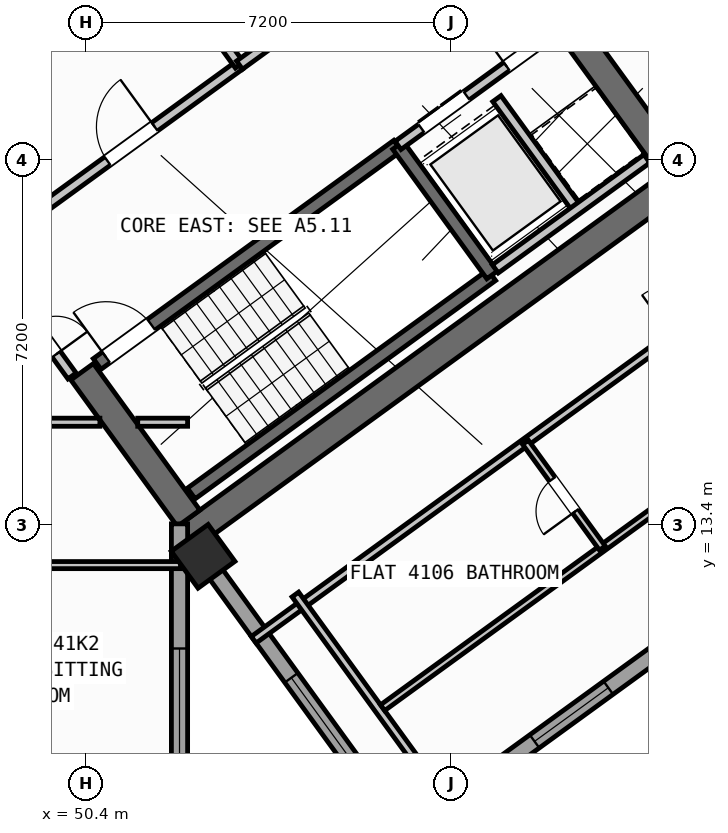
"""IFC4 building model, lengths in metres.
Left out: names, types, materials, properties, quantities, classifications, styles, units other than length and angle.
Written with IfcOpenShell. Run it as: python <this file> out.ifc"""

import sys

from ifc_helpers import new_model, si_unit, direction, frame, frame_2d, origin, origin_2d, place, context, subcontext, project, spatial, rectangle, hollow_rectangle, extrude, source, transform, mapped, element, fill, save


model = new_model("IFC4")
c1 = context("Model", 3, precision=1e-05, world=origin(), true_north=direction((0.0, 1.0)))
c2 = subcontext(c1, "Body", "Model", "MODEL_VIEW")
j1 = project(units=[si_unit("LENGTHUNIT", "METRE"), si_unit("PLANEANGLEUNIT", "RADIAN")], contexts=[c1])
p1 = place(None, origin())
s1 = spatial("IfcSite", under=j1, at=p1, CompositionType="ELEMENT")
p2 = place(p1, origin())
s2 = spatial("IfcBuilding", under=s1, at=p2, CompositionType="ELEMENT")
p3 = place(p2, frame((0.0, 0.0, 162.3)))
s3 = spatial("IfcBuildingStorey", under=s2, at=p3, CompositionType="ELEMENT", Elevation=162.3)
p4 = place(p3, frame((52.359, 13.14, 0.0), z_axis=(0.0, 0.0, 1.0), x_axis=(0.809014896919, 0.587788139183, 0.0)))
e1 = element("IfcWall", 1, at=p4, inside=s3, PredefinedType="SHEAR", context=c2, shape_type="SweptSolid", body=[
    extrude(rectangle(XDim=12.34, YDim=0.55, at=frame_2d((6.17, 0.0))), origin(), (0.0, 0.0, 1.0), 3.35),
])
for number, where, z_axis, x_axis in (
    (2, (52.42, 13.524, 0.0), (0.0, 0.0, 1.0), (-0.588, 0.809, 0.0)),
    (3, (61.958, 20.454, 0.0), (0.0, 0.0, 1.0), (-0.588, 0.809, 0.0)),
):
    element("IfcWall", number, at=place(p3, frame(where, z_axis=z_axis, x_axis=x_axis)), inside=s3, PredefinedType="SHEAR", context=c2, shape_type="SweptSolid", body=[
        extrude(rectangle(XDim=3.575, YDim=0.55, at=frame_2d((1.788, 0.0))), origin(), (0.0, 0.0, 1.0), 3.35),
    ])
m1 = source(origin(), c2, "Body", "SweptSolid", [
    extrude(hollow_rectangle(XDim=0.9, YDim=0.9, WallThickness=0.036, at=origin_2d()), origin(), (0.0, 0.0, 1.0), 3.6),
])
p5 = place(p3, frame((52.705, 12.773, 0.0), z_axis=(0.0, 0.0, 1.0), x_axis=(0.809016994375, 0.587785252292, 0.0)))
e4 = element("IfcColumn", 4, at=p5, inside=s3, PredefinedType="COLUMN", context=c2, shape_type="MappedRepresentation", body=[
    mapped(m1, transform((0.0, 0.0, 0.0), scale=1.0)),
])
p6 = place(p3, frame((58.455, 35.484, 0.0), z_axis=(0.0, 0.0, 1.0), x_axis=(0.587783625747, -0.809018176127, 0.0)))
e5 = element("IfcWall", 5, at=p6, inside=s3, PredefinedType="STANDARD", context=c2, shape_type="SweptSolid", body=[
    extrude(rectangle(XDim=21.587, YDim=0.32, at=frame_2d((10.794, 0.0))), origin(), (0.0, 0.0, 1.0), 2.775),
])
p7 = place(p6, frame((1.475, 0.0, 0.8)))
e6 = element("IfcOpeningElement", 6, at=p7, cuts=e5, PredefinedType="OPENING", context=c2, shape_type="SweptSolid", body=[
    extrude(rectangle(XDim=2.1, YDim=1.55, at=frame_2d((1.05, 0.775))), frame((0.0, 0.17, 0.0), z_axis=(0.0, -1.0, 0.0), x_axis=(1.0, 0.0, 0.0)), (0.0, 0.0, 1.0), 0.34),
])
p8 = place(p6, frame((5.13, 0.0, 0.85)))
e7 = element("IfcOpeningElement", 7, at=p8, cuts=e5, PredefinedType="OPENING", context=c2, shape_type="SweptSolid", body=[
    extrude(rectangle(XDim=1.5, YDim=1.5, at=frame_2d((0.75, 0.75))), frame((0.0, 0.17, 0.0), z_axis=(0.0, -1.0, 0.0), x_axis=(1.0, 0.0, 0.0)), (0.0, 0.0, 1.0), 0.34),
])
p9 = place(p6, frame((8.929, 0.0, 0.85)))
e8 = element("IfcOpeningElement", 8, at=p9, cuts=e5, PredefinedType="OPENING", context=c2, shape_type="SweptSolid", body=[
    extrude(rectangle(XDim=1.5, YDim=1.5, at=frame_2d((0.75, 0.75))), frame((0.0, 0.17, 0.0), z_axis=(0.0, -1.0, 0.0), x_axis=(1.0, 0.0, 0.0)), (0.0, 0.0, 1.0), 0.34),
])
p10 = place(p6, frame((17.581, 0.0, 0.95)))
e9 = element("IfcOpeningElement", 9, at=p10, cuts=e5, PredefinedType="OPENING", context=c2, shape_type="SweptSolid", body=[
    extrude(rectangle(XDim=1.2, YDim=1.4, at=frame_2d((0.6, 0.7))), frame((0.0, 0.17, 0.0), z_axis=(0.0, -1.0, 0.0), x_axis=(1.0, 0.0, 0.0)), (0.0, 0.0, 1.0), 0.34),
])
p11 = place(p3, frame((71.098, 17.731, 0.0), z_axis=(0.0, 0.0, 1.0), x_axis=(-0.809021120468, -0.587779573171, 0.0)))
e10 = element("IfcWall", 10, at=p11, inside=s3, PredefinedType="STANDARD", context=c2, shape_type="SweptSolid", body=[
    extrude(rectangle(XDim=17.588, YDim=0.32, at=frame_2d((8.794, 0.0))), origin(), (0.0, 0.0, 1.0), 3.35),
])
p12 = place(p11, frame((1.624, 0.0, 0.0)))
e11 = element("IfcOpeningElement", 11, at=p12, cuts=e10, PredefinedType="OPENING", context=c2, shape_type="SweptSolid", body=[
    extrude(rectangle(XDim=1.05, YDim=2.15, at=frame_2d((0.525, 1.075))), frame((0.0, 0.17, 0.0), z_axis=(0.0, -1.0, 0.0), x_axis=(1.0, 0.0, 0.0)), (0.0, 0.0, 1.0), 0.34),
])
p13 = place(p11, frame((4.104, 0.0, 1.0)))
e12 = element("IfcOpeningElement", 12, at=p13, cuts=e10, PredefinedType="OPENING", context=c2, shape_type="SweptSolid", body=[
    extrude(rectangle(XDim=0.9, YDim=1.25, at=frame_2d((0.45, 0.625))), frame((0.0, 0.17, 0.0), z_axis=(0.0, -1.0, 0.0), x_axis=(1.0, 0.0, 0.0)), (0.0, 0.0, 1.0), 0.34),
])
p14 = place(p11, frame((7.879, 0.0, 0.85)))
e13 = element("IfcOpeningElement", 13, at=p14, cuts=e10, PredefinedType="OPENING", context=c2, shape_type="SweptSolid", body=[
    extrude(rectangle(XDim=1.8, YDim=1.5, at=frame_2d((0.9, 0.75))), frame((0.0, 0.17, 0.0), z_axis=(0.0, -1.0, 0.0), x_axis=(1.0, 0.0, 0.0)), (0.0, 0.0, 1.0), 0.34),
])
p15 = place(p11, frame((12.849, 0.0, 0.85)))
e14 = element("IfcOpeningElement", 14, at=p15, cuts=e10, PredefinedType="OPENING", context=c2, shape_type="SweptSolid", body=[
    extrude(rectangle(XDim=1.8, YDim=1.5, at=frame_2d((0.9, 0.75))), frame((0.0, 0.17, 0.0), z_axis=(0.0, -1.0, 0.0), x_axis=(1.0, 0.0, 0.0)), (0.0, 0.0, 1.0), 0.34),
])
p16 = place(p3, frame((56.581, 7.439, 0.0), z_axis=(0.0, 0.0, 1.0), x_axis=(-0.587771678454, 0.809026856172, 0.0)))
e15 = element("IfcWall", 15, at=p16, inside=s3, PredefinedType="STANDARD", context=c2, shape_type="SweptSolid", body=[
    extrude(rectangle(XDim=6.824, YDim=0.32, at=frame_2d((3.412, 0.0))), origin(), (0.0, 0.0, 1.0), 2.775),
])
p17 = place(p16, frame((1.531, 0.0, 0.8)))
e16 = element("IfcOpeningElement", 16, at=p17, cuts=e15, PredefinedType="OPENING", context=c2, shape_type="SweptSolid", body=[
    extrude(rectangle(XDim=2.1, YDim=1.55, at=frame_2d((1.05, 0.775))), frame((0.0, 0.17, 0.0), z_axis=(0.0, -1.0, 0.0), x_axis=(1.0, 0.0, 0.0)), (0.0, 0.0, 1.0), 0.34),
])
p18 = place(p3, frame((52.24, 13.414, 0.0), z_axis=(0.0, 0.0, 1.0), x_axis=(0.0, -1.0, 0.0)))
e17 = element("IfcWall", 17, at=p18, inside=s3, PredefinedType="STANDARD", context=c2, shape_type="SweptSolid", body=[
    extrude(rectangle(XDim=9.948, YDim=0.32, at=frame_2d((4.974, 0.0))), origin(), (0.0, 0.0, 1.0), 3.35),
])
p19 = place(p18, frame((2.46, 0.0, 0.8)))
e18 = element("IfcOpeningElement", 18, at=p19, cuts=e17, PredefinedType="OPENING", context=c2, shape_type="SweptSolid", body=[
    extrude(rectangle(XDim=2.1, YDim=1.55, at=frame_2d((1.05, 0.775))), frame((0.0, 0.17, 0.0), z_axis=(0.0, -1.0, 0.0), x_axis=(1.0, 0.0, 0.0)), (0.0, 0.0, 1.0), 0.34),
])
p20 = place(p18, frame((7.183, 0.0, 0.85)))
e19 = element("IfcOpeningElement", 19, at=p20, cuts=e17, PredefinedType="OPENING", context=c2, shape_type="SweptSolid", body=[
    extrude(rectangle(XDim=1.8, YDim=1.5, at=frame_2d((0.9, 0.75))), frame((0.0, 0.17, 0.0), z_axis=(0.0, -1.0, 0.0), x_axis=(1.0, 0.0, 0.0)), (0.0, 0.0, 1.0), 0.34),
])
p21 = place(p3, frame((52.472, 14.013, 0.0), z_axis=(0.0, 0.0, 1.0), x_axis=(0.809028366311, 0.587769599847, 0.0)))
e20 = element("IfcWall", 20, at=p21, inside=s3, PredefinedType="SHEAR", context=c2, shape_type="SweptSolid", body=[
    extrude(rectangle(XDim=7.33, YDim=0.26, at=frame_2d((3.665, 0.0))), origin(), (0.0, 0.0, 1.0), 3.35),
])
p22 = place(p3, frame((50.615, 16.57, 0.0), z_axis=(0.0, 0.0, 1.0), x_axis=(0.809028366311, 0.587769599847, 0.0)))
e21 = element("IfcWall", 21, at=p22, inside=s3, PredefinedType="SHEAR", context=c2, shape_type="SweptSolid", body=[
    extrude(rectangle(XDim=7.33, YDim=0.26, at=frame_2d((3.665, 0.0))), origin(), (0.0, 0.0, 1.0), 3.35),
])
p23 = place(p22, frame((0.22, 0.0, 0.0)))
e22 = element("IfcOpeningElement", 22, at=p23, cuts=e21, PredefinedType="OPENING", context=c2, shape_type="SweptSolid", body=[
    extrude(rectangle(XDim=1.1, YDim=2.1, at=frame_2d((0.55, 1.05))), frame((0.0, 0.14, 0.0), z_axis=(0.0, -1.0, 0.0), x_axis=(1.0, 0.0, 0.0)), (0.0, 0.0, 1.0), 0.28),
])
p24 = place(p3, frame((58.41, 18.327, 0.0), z_axis=(0.0, 0.0, 1.0), x_axis=(-0.58776738483, 0.809029975545, 0.0)))
e23 = element("IfcWall", 23, at=p24, inside=s3, PredefinedType="SHEAR", context=c2, shape_type="SweptSolid", body=[
    extrude(rectangle(XDim=3.16, YDim=0.26, at=frame_2d((1.58, 0.0))), origin(), (0.0, 0.0, 1.0), 3.35),
])
p25 = place(p3, frame((47.065, 21.407, 0.0), z_axis=(0.0, 0.0, 1.0), x_axis=(0.809032984992, 0.587763242466, 0.0)))
e24 = element("IfcWall", 24, at=p25, inside=s3, PredefinedType="STANDARD", context=c2, shape_type="SweptSolid", body=[
    extrude(rectangle(XDim=3.448, YDim=0.2, at=frame_2d((1.724, 0.0))), origin(), (0.0, 0.0, 1.0), 3.34),
])
p26 = place(p25, frame((0.458, 0.0, 0.0)))
e25 = element("IfcOpeningElement", 25, at=p26, cuts=e24, PredefinedType="OPENING", context=c2, shape_type="SweptSolid", body=[
    extrude(rectangle(XDim=1.3, YDim=2.2, at=frame_2d((0.65, 1.1))), frame((0.0, 0.11, 0.0), z_axis=(0.0, -1.0, 0.0), x_axis=(1.0, 0.0, 0.0)), (0.0, 0.0, 1.0), 0.22),
])
p27 = place(p3, frame((48.758, 19.077, 0.0), z_axis=(0.0, 0.0, 1.0), x_axis=(0.809005065155, 0.587801671104, 0.0)))
e26 = element("IfcWall", 26, at=p27, inside=s3, PredefinedType="STANDARD", context=c2, shape_type="SweptSolid", body=[
    extrude(rectangle(XDim=5.768, YDim=0.2, at=frame_2d((2.884, 0.0))), origin(), (0.0, 0.0, 1.0), 3.34),
])
p28 = place(p27, frame((2.548, 0.0, 0.0)))
e27 = element("IfcOpeningElement", 27, at=p28, cuts=e26, PredefinedType="OPENING", context=c2, shape_type="SweptSolid", body=[
    extrude(rectangle(XDim=1.15, YDim=2.1, at=frame_2d((0.575, 1.05))), frame((0.0, 0.11, 0.0), z_axis=(0.0, -1.0, 0.0), x_axis=(1.0, 0.0, 0.0)), (0.0, 0.0, 1.0), 0.22),
])
p29 = place(p3, frame((56.553, 20.884, 0.0), z_axis=(0.0, 0.0, 1.0), x_axis=(0.809023564264, 0.58777620951, 0.0)))
e28 = element("IfcWall", 28, at=p29, inside=s3, PredefinedType="STANDARD", context=c2, shape_type="SweptSolid", body=[
    extrude(rectangle(XDim=3.818, YDim=0.2, at=frame_2d((1.909, 0.0))), origin(), (0.0, 0.0, 1.0), 3.34),
])
p30 = place(p29, frame((0.57, 0.0, 0.0)))
e29 = element("IfcOpeningElement", 29, at=p30, cuts=e28, PredefinedType="OPENING", context=c2, shape_type="SweptSolid", body=[
    extrude(rectangle(XDim=1.1, YDim=2.15, at=frame_2d((0.55, 1.075))), frame((0.0, 0.11, 0.0), z_axis=(0.0, -1.0, 0.0), x_axis=(1.0, 0.0, 0.0)), (0.0, 0.0, 1.0), 0.22),
])
p31 = place(p29, frame((2.65, 0.0, 0.0)))
e30 = element("IfcOpeningElement", 30, at=p31, cuts=e28, PredefinedType="OPENING", context=c2, shape_type="SweptSolid", body=[
    extrude(rectangle(XDim=0.86, YDim=2.05, at=frame_2d((0.43, 1.025))), frame((0.0, 0.11, 0.0), z_axis=(0.0, -1.0, 0.0), x_axis=(1.0, 0.0, 0.0)), (0.0, 0.0, 1.0), 0.22),
])
p32 = place(p3, frame((60.067, 19.655, 0.0), z_axis=(0.0, 0.0, 1.0), x_axis=(-0.587800520745, 0.809005900975, 0.0)))
e31 = element("IfcWall", 31, at=p32, inside=s3, PredefinedType="STANDARD", context=c2, shape_type="SweptSolid", body=[
    extrude(rectangle(XDim=2.66, YDim=0.2, at=frame_2d((1.33, 0.0))), origin(), (0.0, 0.0, 1.0), 3.34),
])
p33 = place(p3, frame((58.472, 18.447, 0.0), z_axis=(0.0, 0.0, 1.0), x_axis=(0.809018631237, 0.587782999339, 0.0)))
e32 = element("IfcWall", 32, at=p33, inside=s3, PredefinedType="STANDARD", context=c2, shape_type="SweptSolid", body=[
    extrude(rectangle(XDim=3.698, YDim=0.2, at=frame_2d((1.849, 0.0))), origin(), (0.0, 0.0, 1.0), 3.34),
])
p34 = place(p3, frame((53.425, 22.468, 0.0), z_axis=(0.0, 0.0, 1.0), x_axis=(-0.5877230039, 0.809062216821, 0.0)))
e33 = element("IfcWall", 33, at=p34, inside=s3, PredefinedType="STANDARD", context=c2, shape_type="SweptSolid", body=[
    extrude(rectangle(XDim=2.88, YDim=0.2, at=frame_2d((1.44, 0.0))), origin(), (0.0, 0.0, 1.0), 3.34),
])
p35 = place(p3, frame((53.425, 22.468, 0.0), z_axis=(0.0, 0.0, 1.0), x_axis=(0.809024377198, 0.587775090574, 0.0)))
e34 = element("IfcWall", 34, at=p35, inside=s3, PredefinedType="STANDARD", context=c2, shape_type="SweptSolid", body=[
    extrude(rectangle(XDim=5.418, YDim=0.2, at=frame_2d((2.709, 0.0))), origin(), (0.0, 0.0, 1.0), 3.34),
])
p36 = place(p35, frame((4.28, 0.0, 0.0)))
e35 = element("IfcOpeningElement", 35, at=p36, cuts=e34, PredefinedType="OPENING", context=c2, shape_type="SweptSolid", body=[
    extrude(rectangle(XDim=0.86, YDim=2.05, at=frame_2d((0.43, 1.025))), frame((0.0, 0.11, 0.0), z_axis=(0.0, -1.0, 0.0), x_axis=(1.0, 0.0, 0.0)), (0.0, 0.0, 1.0), 0.22),
])
p37 = place(p35, frame((1.45, 0.0, 0.0)))
e36 = element("IfcOpeningElement", 36, at=p37, cuts=e34, PredefinedType="OPENING", context=c2, shape_type="SweptSolid", body=[
    extrude(rectangle(XDim=0.86, YDim=2.05, at=frame_2d((0.43, 1.025))), frame((0.0, 0.11, 0.0), z_axis=(0.0, -1.0, 0.0), x_axis=(1.0, 0.0, 0.0)), (0.0, 0.0, 1.0), 0.22),
])
p38 = place(p3, frame((35.237, 15.42, 0.0), z_axis=(0.0, 0.0, 1.0), x_axis=(1.0, 0.0, 0.0)))
e37 = element("IfcWall", 37, at=p38, inside=s3, PredefinedType="PARTITIONING", context=c2, shape_type="SweptSolid", body=[
    extrude(rectangle(XDim=15.432, YDim=0.16, at=frame_2d((7.716, 0.0))), origin(), (0.0, 0.0, 1.0), 3.34),
])
p39 = place(p38, frame((0.674, 0.0, 0.0)))
e38 = element("IfcOpeningElement", 38, at=p39, cuts=e37, PredefinedType="OPENING", context=c2, shape_type="SweptSolid", body=[
    extrude(rectangle(XDim=1.0, YDim=2.1, at=frame_2d((0.5, 1.05))), frame((0.0, 0.09, 0.0), z_axis=(0.0, -1.0, 0.0), x_axis=(1.0, 0.0, 0.0)), (0.0, 0.0, 1.0), 0.18),
])
p40 = place(p38, frame((9.094, 0.0, 0.0)))
e39 = element("IfcOpeningElement", 39, at=p40, cuts=e37, PredefinedType="OPENING", context=c2, shape_type="SweptSolid", body=[
    extrude(rectangle(XDim=1.0, YDim=2.1, at=frame_2d((0.5, 1.05))), frame((0.0, 0.09, 0.0), z_axis=(0.0, -1.0, 0.0), x_axis=(1.0, 0.0, 0.0)), (0.0, 0.0, 1.0), 0.18),
])
p41 = place(p3, frame((51.416, 15.42, 0.0), z_axis=(0.0, 0.0, 1.0), x_axis=(1.0, 0.0, 0.0)))
e40 = element("IfcWall", 40, at=p41, inside=s3, PredefinedType="PARTITIONING", context=c2, shape_type="SweptSolid", body=[
    extrude(rectangle(XDim=0.984, YDim=0.16, at=frame_2d((0.492, 0.0))), origin(), (0.0, 0.0, 1.0), 3.34),
])
p42 = place(p3, frame((50.119, 16.333, 0.0), z_axis=(0.0, 0.0, 1.0), x_axis=(-0.587749856981, 0.809042709391, 0.0)))
e41 = element("IfcWall", 41, at=p42, inside=s3, PredefinedType="STANDARD", context=c2, shape_type="SweptSolid", body=[
    extrude(rectangle(XDim=2.96, YDim=0.2, at=frame_2d((1.48, 0.0))), origin(), (0.0, 0.0, 1.0), 3.34),
])
p43 = place(p42, frame((0.53, 0.0, 0.0)))
e42 = element("IfcOpeningElement", 42, at=p43, cuts=e41, PredefinedType="OPENING", context=c2, shape_type="SweptSolid", body=[
    extrude(rectangle(XDim=1.5, YDim=2.15, at=frame_2d((0.75, 1.075))), frame((0.0, 0.11, 0.0), z_axis=(0.0, -1.0, 0.0), x_axis=(1.0, 0.0, 0.0)), (0.0, 0.0, 1.0), 0.22),
])
p44 = place(p3, frame((47.663, 12.6, 0.0), z_axis=(0.0, 0.0, 1.0), x_axis=(1.0, 0.0, 0.0)))
e43 = element("IfcWall", 43, at=p44, inside=s3, PredefinedType="PLUMBINGWALL", context=c2, shape_type="SweptSolid", body=[
    extrude(rectangle(XDim=4.597, YDim=0.14, at=frame_2d((2.298, 0.0))), origin(), (0.0, 0.0, 1.0), 2.525),
])
p45 = place(p3, frame((53.705, 11.126, 0.0), z_axis=(0.0, 0.0, 1.0), x_axis=(0.809014504436, 0.587788679384, 0.0)))
e44 = element("IfcWall", 44, at=p45, inside=s3, PredefinedType="PARTITIONING", context=c2, shape_type="SweptSolid", body=[
    extrude(rectangle(XDim=14.67, YDim=0.16, at=frame_2d((7.335, 0.0))), origin(), (0.0, 0.0, 1.0), 3.34),
])
p46 = place(p45, frame((10.2, 0.0, 0.0)))
e45 = element("IfcOpeningElement", 45, at=p46, cuts=e44, PredefinedType="OPENING", context=c2, shape_type="SweptSolid", body=[
    extrude(rectangle(XDim=1.0, YDim=2.1, at=frame_2d((0.5, 1.05))), frame((0.0, 0.09, 0.0), z_axis=(0.0, -1.0, 0.0), x_axis=(1.0, 0.0, 0.0)), (0.0, 0.0, 1.0), 0.18),
])
p47 = place(p3, frame((57.747, 7.586, 0.0), z_axis=(0.0, 0.0, 1.0), x_axis=(-0.587784893399, 0.809017255126, 0.0)))
e46 = element("IfcWall", 46, at=p47, inside=s3, PredefinedType="PARTITIONING", context=c2, shape_type="SweptSolid", body=[
    extrude(rectangle(XDim=5.48, YDim=0.16, at=frame_2d((2.74, 0.0))), origin(), (0.0, 0.0, 1.0), 3.34),
])
p48 = place(p3, frame((56.249, 9.785, 0.0), z_axis=(0.0, 0.0, 1.0), x_axis=(0.809011747655, 0.587792473715, 0.0)))
e47 = element("IfcWall", 47, at=p48, inside=s3, PredefinedType="PLUMBINGWALL", context=c2, shape_type="SweptSolid", body=[
    extrude(rectangle(XDim=13.4, YDim=0.14, at=frame_2d((6.7, 0.0))), origin(), (0.0, 0.0, 1.0), 3.34),
])
p49 = place(p48, frame((8.94, 0.0, 0.0)))
e48 = element("IfcOpeningElement", 48, at=p49, cuts=e47, PredefinedType="OPENING", context=c2, shape_type="SweptSolid", body=[
    extrude(rectangle(XDim=0.92, YDim=2.08, at=frame_2d((0.46, 1.04))), frame((0.0, 0.08, 0.0), z_axis=(0.0, -1.0, 0.0), x_axis=(1.0, 0.0, 0.0)), (0.0, 0.0, 1.0), 0.16),
])
p50 = place(p3, frame((60.585, 12.936, 0.0), z_axis=(0.0, 0.0, 1.0), x_axis=(-0.587772116736, 0.809026537752, 0.0)))
e49 = element("IfcWall", 49, at=p50, inside=s3, PredefinedType="PLUMBINGWALL", context=c2, shape_type="SweptSolid", body=[
    extrude(rectangle(XDim=2.58, YDim=0.14, at=frame_2d((1.29, 0.0))), origin(), (0.0, 0.0, 1.0), 3.34),
])
p51 = place(p50, frame((0.9, 0.0, 0.0)))
e50 = element("IfcOpeningElement", 50, at=p51, cuts=e49, PredefinedType="OPENING", context=c2, shape_type="SweptSolid", body=[
    extrude(rectangle(XDim=0.78, YDim=2.05, at=frame_2d((0.39, 1.025))), frame((0.0, 0.08, 0.0), z_axis=(0.0, -1.0, 0.0), x_axis=(1.0, 0.0, 0.0)), (0.0, 0.0, 1.0), 0.16),
])
m2 = source(origin(), c2, "Body", "SweptSolid", [
    extrude(rectangle(XDim=1.8, YDim=1.5, at=frame_2d((0.9, 0.75))), frame((0.0, 0.03, 0.0), z_axis=(0.0, -1.0, 0.0), x_axis=(1.0, 0.0, 0.0)), (0.0, 0.0, 1.0), 0.06),
])
p52 = place(p15, origin())
e51 = element("IfcWindow", 51, at=p52, inside=s3, PartitioningType="SINGLE_PANEL", PredefinedType="WINDOW", context=c2, shape_type="MappedRepresentation", body=[
    mapped(m2, transform((0.0, 0.0, 0.0), scale=1.0)),
])
fill(e14, e51)
m3 = source(origin(), c2, "Body", "SweptSolid", [
    extrude(rectangle(XDim=2.1, YDim=1.55, at=frame_2d((1.05, 0.775))), frame((0.0, 0.03, 0.0), z_axis=(0.0, -1.0, 0.0), x_axis=(1.0, 0.0, 0.0)), (0.0, 0.0, 1.0), 0.06),
])
p53 = place(p17, origin())
e52 = element("IfcWindow", 52, at=p53, inside=s3, PartitioningType="SINGLE_PANEL", PredefinedType="WINDOW", context=c2, shape_type="MappedRepresentation", body=[
    mapped(m3, transform((0.0, 0.0, 0.0), scale=1.0)),
])
fill(e16, e52)
p54 = place(p19, origin())
e53 = element("IfcWindow", 53, at=p54, inside=s3, PartitioningType="SINGLE_PANEL", PredefinedType="WINDOW", context=c2, shape_type="MappedRepresentation", body=[
    mapped(m3, transform((0.0, 0.0, 0.0), scale=1.0)),
])
fill(e18, e53)
m4 = source(origin(), c2, "Body", "SweptSolid", [
    extrude(rectangle(XDim=1.1, YDim=2.1, at=frame_2d((0.55, 1.05))), frame((0.0, 0.025, 0.0), z_axis=(0.0, -1.0, 0.0), x_axis=(1.0, 0.0, 0.0)), (0.0, 0.0, 1.0), 0.05),
])
p55 = place(p23, origin())
e54 = element("IfcDoor", 54, at=p55, inside=s3, OperationType="SINGLE_SWING_LEFT", PredefinedType="DOOR", context=c2, shape_type="MappedRepresentation", body=[
    mapped(m4, transform((0.0, 0.0, 0.0), scale=1.0)),
])
fill(e22, e54)
m5 = source(origin(), c2, "Body", "SweptSolid", [
    extrude(rectangle(XDim=1.15, YDim=2.1, at=frame_2d((0.575, 1.05))), frame((0.0, 0.025, 0.0), z_axis=(0.0, -1.0, 0.0), x_axis=(1.0, 0.0, 0.0)), (0.0, 0.0, 1.0), 0.05),
])
p56 = place(p28, origin())
e55 = element("IfcDoor", 55, at=p56, inside=s3, OperationType="SINGLE_SWING_RIGHT", PredefinedType="DOOR", context=c2, shape_type="MappedRepresentation", body=[
    mapped(m5, transform((0.0, 0.0, 0.0), scale=1.0)),
])
fill(e27, e55)
m6 = source(origin(), c2, "Body", "SweptSolid", [
    extrude(rectangle(XDim=1.1, YDim=2.15, at=frame_2d((0.55, 1.075))), frame((0.0, 0.025, 0.0), z_axis=(0.0, -1.0, 0.0), x_axis=(1.0, 0.0, 0.0)), (0.0, 0.0, 1.0), 0.05),
])
p57 = place(p30, origin())
e56 = element("IfcDoor", 56, at=p57, inside=s3, OperationType="DOUBLE_DOOR_SLIDING", PredefinedType="DOOR", context=c2, shape_type="MappedRepresentation", body=[
    mapped(m6, transform((0.0, 0.0, 0.0), scale=1.0)),
])
fill(e29, e56)
m7 = source(origin(), c2, "Body", "SweptSolid", [
    extrude(rectangle(XDim=0.86, YDim=2.05, at=frame_2d((0.43, 1.025))), frame((0.0, 0.025, 0.0), z_axis=(0.0, -1.0, 0.0), x_axis=(1.0, 0.0, 0.0)), (0.0, 0.0, 1.0), 0.05),
])
p58 = place(p31, origin())
e57 = element("IfcDoor", 57, at=p58, inside=s3, OperationType="SINGLE_SWING_LEFT", PredefinedType="DOOR", context=c2, shape_type="MappedRepresentation", body=[
    mapped(m7, transform((0.0, 0.0, 0.0), scale=1.0)),
])
fill(e30, e57)
m8 = source(origin(), c2, "Body", "SweptSolid", [
    extrude(rectangle(XDim=1.5, YDim=2.15, at=frame_2d((0.75, 1.075))), frame((0.0, 0.025, 0.0), z_axis=(0.0, -1.0, 0.0), x_axis=(1.0, 0.0, 0.0)), (0.0, 0.0, 1.0), 0.05),
])
p59 = place(p43, frame((1.5, 0.0, 0.0), z_axis=(0.0, 0.0, 1.0), x_axis=(-1.0, 0.0, 0.0)))
e58 = element("IfcDoor", 58, at=p59, inside=s3, OperationType="DOUBLE_DOOR_SINGLE_SWING", PredefinedType="DOOR", context=c2, shape_type="MappedRepresentation", body=[
    mapped(m8, transform((0.0, 0.0, 0.0), scale=1.0)),
])
fill(e42, e58)
m9 = source(origin(), c2, "Body", "SweptSolid", [
    extrude(rectangle(XDim=0.78, YDim=2.05, at=frame_2d((0.39, 1.025))), frame((0.0, 0.025, 0.0), z_axis=(0.0, -1.0, 0.0), x_axis=(1.0, 0.0, 0.0)), (0.0, 0.0, 1.0), 0.05),
])
p60 = place(p51, origin())
e59 = element("IfcDoor", 59, at=p60, inside=s3, OperationType="SINGLE_SWING_LEFT", PredefinedType="DOOR", context=c2, shape_type="MappedRepresentation", body=[
    mapped(m9, transform((0.0, 0.0, 0.0), scale=1.0)),
])
fill(e50, e59)
save(model, sys.argv[1])
